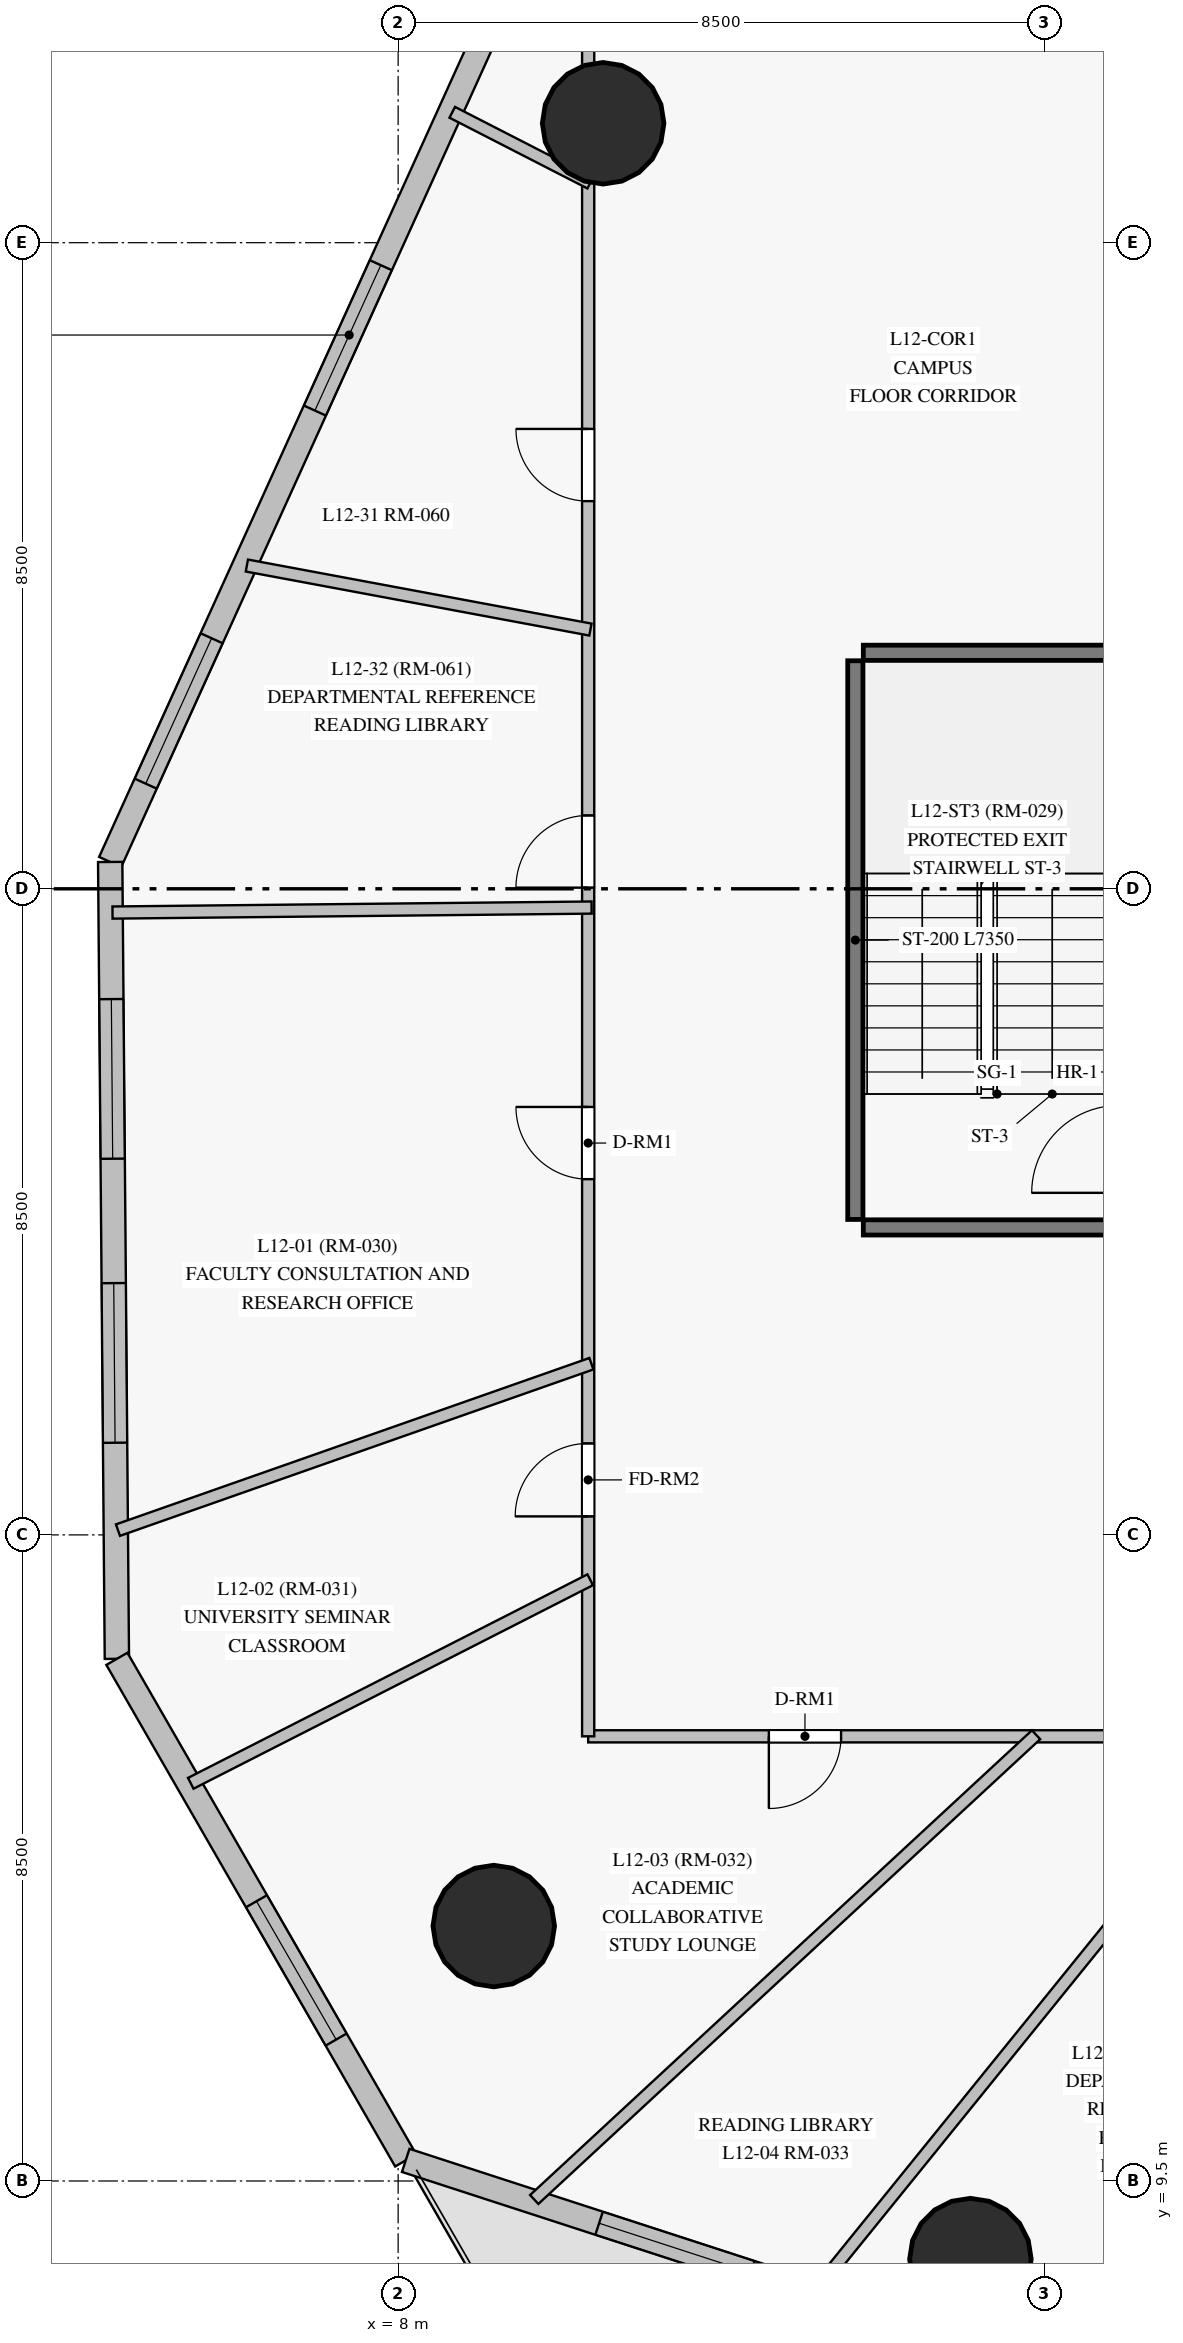
"""IFC4 building model, lengths in metres.
Left out: names, types, materials, properties, quantities, classifications, styles, units other than length and angle.
Written with IfcOpenShell. Run it as: python <this file> out.ifc"""

import sys

from ifc_helpers import new_model, si_unit, direction, frame, frame_2d, origin, origin_with_axes, origin_2d, place, context, subcontext, project, spatial, rectangle, circle, extrude, source, transform, mapped, element, fill, save


model = new_model("IFC4")
c1 = context("Model", 3, precision=1e-05, world=origin(), true_north=direction((0.0, 1.0)))
c2 = subcontext(c1, "Body", "Model", "MODEL_VIEW")
j1 = project(units=[si_unit("LENGTHUNIT", "METRE"), si_unit("PLANEANGLEUNIT", "RADIAN")], contexts=[c1])
p1 = place(None, origin())
s1 = spatial("IfcSite", under=j1, at=p1, CompositionType="ELEMENT")
p2 = place(p1, origin())
s2 = spatial("IfcBuilding", under=s1, at=p2, CompositionType="ELEMENT")
p3 = place(p2, frame((0.0, 0.0, 48.1)))
s3 = spatial("IfcBuildingStorey", under=s2, at=p3, CompositionType="ELEMENT", Elevation=48.1)
m1 = source(origin_with_axes(), c2, "Body", "SweptSolid", [
    extrude(circle(Radius=0.8, at=origin_2d()), origin(), (0.0, 0.0, 1.0), 3.6),
])
for number, where, z_axis, x_axis in (
    (1, (10.697, 36.571, 0.0), (0.0, 0.0, 1.0), (1.0, 0.0, 0.0)),
    (2, (9.258, 12.854, 0.0), (0.0, 0.0, 1.0), (1.0, 0.0, 0.0)),
    (3, (15.529, 8.472, 0.0), (0.0, 0.0, 1.0), (1.0, 0.0, 0.0)),
):
    element("IfcColumn", number, at=place(p3, frame(where, z_axis=z_axis, x_axis=x_axis)), inside=s3, PredefinedType="COLUMN", context=c2, shape_type="MappedRepresentation", body=[
        mapped(m1, transform((0.0, 0.0, 0.0), scale=1.0)),
    ])
p4 = place(p3, frame((10.499, 40.718, 0.0), z_axis=(0.0, 0.0, 1.0), x_axis=(-0.41300414516, -0.91072914529, 0.0)))
e4 = element("IfcWall", 4, at=p4, inside=s3, PredefinedType="SOLIDWALL", context=c2, shape_type="SweptSolid", body=[
    extrude(rectangle(XDim=15.224, YDim=0.32, at=frame_2d((7.612, 0.0))), origin(), (0.0, 0.0, 1.0), 3.35),
])
p5 = place(p4, frame((1.173, 0.0, 0.85)))
e5 = element("IfcOpeningElement", 5, at=p5, cuts=e4, PredefinedType="OPENING", context=c2, shape_type="SweptSolid", body=[
    extrude(rectangle(XDim=2.1, YDim=1.95, at=frame_2d((1.05, 0.975))), frame((0.0, 0.17, 0.0), z_axis=(0.0, -1.0, 0.0), x_axis=(1.0, 0.0, 0.0)), (0.0, 0.0, 1.0), 0.34),
])
p6 = place(p4, frame((6.603, 0.0, 0.85)))
e6 = element("IfcOpeningElement", 6, at=p6, cuts=e4, PredefinedType="OPENING", context=c2, shape_type="SweptSolid", body=[
    extrude(rectangle(XDim=2.1, YDim=1.95, at=frame_2d((1.05, 0.975))), frame((0.0, 0.17, 0.0), z_axis=(0.0, -1.0, 0.0), x_axis=(1.0, 0.0, 0.0)), (0.0, 0.0, 1.0), 0.34),
])
p7 = place(p4, frame((11.993, 0.0, 0.85)))
e7 = element("IfcOpeningElement", 7, at=p7, cuts=e4, PredefinedType="OPENING", context=c2, shape_type="SweptSolid", body=[
    extrude(rectangle(XDim=2.1, YDim=1.95, at=frame_2d((1.05, 0.975))), frame((0.0, 0.17, 0.0), z_axis=(0.0, -1.0, 0.0), x_axis=(1.0, 0.0, 0.0)), (0.0, 0.0, 1.0), 0.34),
])
p8 = place(p3, frame((4.212, 26.853, 0.0), z_axis=(0.0, 0.0, 1.0), x_axis=(0.00840678256, -0.999964662379, 0.0)))
e8 = element("IfcWall", 8, at=p8, inside=s3, PredefinedType="SOLIDWALL", context=c2, shape_type="SweptSolid", body=[
    extrude(rectangle(XDim=10.484, YDim=0.32, at=frame_2d((5.242, 0.0))), origin(), (0.0, 0.0, 1.0), 3.35),
])
p9 = place(p8, frame((1.804, 0.0, 0.85)))
e9 = element("IfcOpeningElement", 9, at=p9, cuts=e8, PredefinedType="OPENING", context=c2, shape_type="SweptSolid", body=[
    extrude(rectangle(XDim=2.1, YDim=1.95, at=frame_2d((1.05, 0.975))), frame((0.0, 0.17, 0.0), z_axis=(0.0, -1.0, 0.0), x_axis=(1.0, 0.0, 0.0)), (0.0, 0.0, 1.0), 0.34),
])
p10 = place(p8, frame((5.541, 0.0, 0.85)))
e10 = element("IfcOpeningElement", 10, at=p10, cuts=e8, PredefinedType="OPENING", context=c2, shape_type="SweptSolid", body=[
    extrude(rectangle(XDim=2.1, YDim=1.95, at=frame_2d((1.05, 0.975))), frame((0.0, 0.17, 0.0), z_axis=(0.0, -1.0, 0.0), x_axis=(1.0, 0.0, 0.0)), (0.0, 0.0, 1.0), 0.34),
])
p11 = place(p3, frame((4.3, 16.369, 0.0), z_axis=(0.0, 0.0, 1.0), x_axis=(0.499036685569, -0.866580859733, 0.0)))
e11 = element("IfcWall", 11, at=p11, inside=s3, PredefinedType="SOLIDWALL", context=c2, shape_type="SweptSolid", body=[
    extrude(rectangle(XDim=7.614, YDim=0.32, at=frame_2d((3.807, 0.0))), origin(), (0.0, 0.0, 1.0), 3.35),
])
p12 = place(p11, frame((3.68, 0.0, 0.85)))
e12 = element("IfcOpeningElement", 12, at=p12, cuts=e11, PredefinedType="OPENING", context=c2, shape_type="SweptSolid", body=[
    extrude(rectangle(XDim=2.1, YDim=1.95, at=frame_2d((1.05, 0.975))), frame((0.0, 0.17, 0.0), z_axis=(0.0, -1.0, 0.0), x_axis=(1.0, 0.0, 0.0)), (0.0, 0.0, 1.0), 0.34),
])
p13 = place(p3, frame((8.1, 9.771, 0.0), z_axis=(0.0, 0.0, 1.0), x_axis=(0.951043115776, -0.30905823389, 0.0)))
e13 = element("IfcWall", 13, at=p13, inside=s3, PredefinedType="SOLIDWALL", context=c2, shape_type="SweptSolid", body=[
    extrude(rectangle(XDim=18.442, YDim=0.32, at=frame_2d((9.221, 0.0))), origin(), (0.0, 0.0, 1.0), 3.35),
])
p14 = place(p13, frame((2.675, 0.0, 0.85)))
e14 = element("IfcOpeningElement", 14, at=p14, cuts=e13, PredefinedType="OPENING", context=c2, shape_type="SweptSolid", body=[
    extrude(rectangle(XDim=2.1, YDim=1.95, at=frame_2d((1.05, 0.975))), frame((0.0, 0.17, 0.0), z_axis=(0.0, -1.0, 0.0), x_axis=(1.0, 0.0, 0.0)), (0.0, 0.0, 1.0), 0.34),
])
p15 = place(p13, frame((10.64, 0.0, 0.85)))
e15 = element("IfcOpeningElement", 15, at=p15, cuts=e13, PredefinedType="OPENING", context=c2, shape_type="SweptSolid", body=[
    extrude(rectangle(XDim=2.1, YDim=1.95, at=frame_2d((1.05, 0.975))), frame((0.0, 0.17, 0.0), z_axis=(0.0, -1.0, 0.0), x_axis=(1.0, 0.0, 0.0)), (0.0, 0.0, 1.0), 0.34),
])
p16 = place(p13, frame((14.843, 0.0, 0.0)))
e16 = element("IfcOpeningElement", 16, at=p16, cuts=e13, PredefinedType="OPENING", context=c2, shape_type="SweptSolid", body=[
    extrude(rectangle(XDim=1.05, YDim=2.12, at=frame_2d((0.525, 1.06))), frame((0.0, 0.17, 0.0), z_axis=(0.0, -1.0, 0.0), x_axis=(1.0, 0.0, 0.0)), (0.0, 0.0, 1.0), 0.34),
])
p17 = place(p3, frame((14.015, 22.15, 0.0), z_axis=(0.0, 0.0, 1.0), x_axis=(0.0, 1.0, 0.0)))
e17 = element("IfcWall", 17, at=p17, inside=s3, PredefinedType="SHEAR", context=c2, shape_type="SweptSolid", body=[
    extrude(rectangle(XDim=7.35, YDim=0.2, at=frame_2d((3.675, 0.0))), origin(), (0.0, 0.0, 1.0), 3.35),
])
for number, where, z_axis, x_axis in (
    (18, (14.12, 22.045, 0.0), (0.0, 0.0, 1.0), (1.0, 0.0, 0.0)),
    (19, (14.12, 29.605, 0.0), (0.0, 0.0, 1.0), (1.0, 0.0, 0.0)),
):
    element("IfcWall", number, at=place(p3, frame(where, z_axis=z_axis, x_axis=x_axis)), inside=s3, PredefinedType="SHEAR", context=c2, shape_type="SweptSolid", body=[
        extrude(rectangle(XDim=3.26, YDim=0.2, at=frame_2d((1.63, 0.0))), origin(), (0.0, 0.0, 1.0), 3.35),
    ])
p18 = place(p3, frame((40.25, 15.35, 0.0), z_axis=(0.0, 0.0, 1.0), x_axis=(-1.0, 0.0, 0.0)))
e20 = element("IfcWall", 20, at=p18, inside=s3, PredefinedType="PARTITIONING", context=c2, shape_type="SweptSolid", body=[
    extrude(rectangle(XDim=29.75, YDim=0.16, at=frame_2d((14.875, 0.0))), origin(), (0.0, 0.0, 1.0), 2.7),
])
p19 = place(p18, frame((26.423, 0.0, 0.0)))
e21 = element("IfcOpeningElement", 21, at=p19, cuts=e20, PredefinedType="OPENING", context=c2, shape_type="SweptSolid", body=[
    extrude(rectangle(XDim=0.95, YDim=2.15, at=frame_2d((0.475, 1.075))), frame((0.0, 0.09, 0.0), z_axis=(0.0, -1.0, 0.0), x_axis=(1.0, 0.0, 0.0)), (0.0, 0.0, 1.0), 0.18),
])
p20 = place(p18, frame((21.837, 0.0, 0.0)))
e22 = element("IfcOpeningElement", 22, at=p20, cuts=e20, PredefinedType="OPENING", context=c2, shape_type="SweptSolid", body=[
    extrude(rectangle(XDim=0.95, YDim=2.15, at=frame_2d((0.475, 1.075))), frame((0.0, 0.09, 0.0), z_axis=(0.0, -1.0, 0.0), x_axis=(1.0, 0.0, 0.0)), (0.0, 0.0, 1.0), 0.18),
])
p21 = place(p18, frame((18.863, 0.0, 0.0)))
e23 = element("IfcOpeningElement", 23, at=p21, cuts=e20, PredefinedType="OPENING", context=c2, shape_type="SweptSolid", body=[
    extrude(rectangle(XDim=0.95, YDim=2.15, at=frame_2d((0.475, 1.075))), frame((0.0, 0.09, 0.0), z_axis=(0.0, -1.0, 0.0), x_axis=(1.0, 0.0, 0.0)), (0.0, 0.0, 1.0), 0.18),
])
p22 = place(p18, frame((16.388, 0.0, 0.0)))
e24 = element("IfcOpeningElement", 24, at=p22, cuts=e20, PredefinedType="OPENING", context=c2, shape_type="SweptSolid", body=[
    extrude(rectangle(XDim=0.95, YDim=2.15, at=frame_2d((0.475, 1.075))), frame((0.0, 0.09, 0.0), z_axis=(0.0, -1.0, 0.0), x_axis=(1.0, 0.0, 0.0)), (0.0, 0.0, 1.0), 0.18),
])
p23 = place(p18, frame((14.4, 0.0, 0.0)))
e25 = element("IfcOpeningElement", 25, at=p23, cuts=e20, PredefinedType="OPENING", context=c2, shape_type="SweptSolid", body=[
    extrude(rectangle(XDim=0.95, YDim=2.15, at=frame_2d((0.475, 1.075))), frame((0.0, 0.09, 0.0), z_axis=(0.0, -1.0, 0.0), x_axis=(1.0, 0.0, 0.0)), (0.0, 0.0, 1.0), 0.18),
])
p24 = place(p18, frame((12.118, 0.0, 0.0)))
e26 = element("IfcOpeningElement", 26, at=p24, cuts=e20, PredefinedType="OPENING", context=c2, shape_type="SweptSolid", body=[
    extrude(rectangle(XDim=0.95, YDim=2.15, at=frame_2d((0.475, 1.075))), frame((0.0, 0.09, 0.0), z_axis=(0.0, -1.0, 0.0), x_axis=(1.0, 0.0, 0.0)), (0.0, 0.0, 1.0), 0.18),
])
p25 = place(p18, frame((9.938, 0.0, 0.0)))
e27 = element("IfcOpeningElement", 27, at=p25, cuts=e20, PredefinedType="OPENING", context=c2, shape_type="SweptSolid", body=[
    extrude(rectangle(XDim=0.95, YDim=2.15, at=frame_2d((0.475, 1.075))), frame((0.0, 0.09, 0.0), z_axis=(0.0, -1.0, 0.0), x_axis=(1.0, 0.0, 0.0)), (0.0, 0.0, 1.0), 0.18),
])
p26 = place(p18, frame((6.962, 0.0, 0.0)))
e28 = element("IfcOpeningElement", 28, at=p26, cuts=e20, PredefinedType="OPENING", context=c2, shape_type="SweptSolid", body=[
    extrude(rectangle(XDim=0.95, YDim=2.15, at=frame_2d((0.475, 1.075))), frame((0.0, 0.09, 0.0), z_axis=(0.0, -1.0, 0.0), x_axis=(1.0, 0.0, 0.0)), (0.0, 0.0, 1.0), 0.18),
])
p27 = place(p3, frame((10.5, 15.35, 0.0), z_axis=(0.0, 0.0, 1.0), x_axis=(0.0, 1.0, 0.0)))
e29 = element("IfcWall", 29, at=p27, inside=s3, PredefinedType="PARTITIONING", context=c2, shape_type="SweptSolid", body=[
    extrude(rectangle(XDim=22.3, YDim=0.16, at=frame_2d((11.15, 0.0))), origin(), (0.0, 0.0, 1.0), 2.75),
])
p28 = place(p27, frame((7.33, 0.0, 0.0)))
e30 = element("IfcOpeningElement", 30, at=p28, cuts=e29, PredefinedType="OPENING", context=c2, shape_type="SweptSolid", body=[
    extrude(rectangle(XDim=0.95, YDim=2.15, at=frame_2d((0.475, 1.075))), frame((0.0, 0.09, 0.0), z_axis=(0.0, -1.0, 0.0), x_axis=(1.0, 0.0, 0.0)), (0.0, 0.0, 1.0), 0.18),
])
p29 = place(p27, frame((2.893, 0.0, 0.0)))
e31 = element("IfcOpeningElement", 31, at=p29, cuts=e29, PredefinedType="OPENING", context=c2, shape_type="SweptSolid", body=[
    extrude(rectangle(XDim=0.96, YDim=2.15, at=frame_2d((0.48, 1.075))), frame((0.0, 0.09, 0.0), z_axis=(0.0, -1.0, 0.0), x_axis=(1.0, 0.0, 0.0)), (0.0, 0.0, 1.0), 0.18),
])
p30 = place(p27, frame((16.25, 0.0, 0.0)))
e32 = element("IfcOpeningElement", 32, at=p30, cuts=e29, PredefinedType="OPENING", context=c2, shape_type="SweptSolid", body=[
    extrude(rectangle(XDim=0.95, YDim=2.15, at=frame_2d((0.475, 1.075))), frame((0.0, 0.09, 0.0), z_axis=(0.0, -1.0, 0.0), x_axis=(1.0, 0.0, 0.0)), (0.0, 0.0, 1.0), 0.18),
])
p31 = place(p27, frame((11.165, 0.0, 0.0)))
e33 = element("IfcOpeningElement", 33, at=p31, cuts=e29, PredefinedType="OPENING", context=c2, shape_type="SweptSolid", body=[
    extrude(rectangle(XDim=0.95, YDim=2.15, at=frame_2d((0.475, 1.075))), frame((0.0, 0.09, 0.0), z_axis=(0.0, -1.0, 0.0), x_axis=(1.0, 0.0, 0.0)), (0.0, 0.0, 1.0), 0.18),
])
p32 = place(p3, frame((19.423, 15.385, 0.0), z_axis=(0.0, 0.0, 1.0), x_axis=(-0.629284562833, -0.777174973208, 0.0)))
e34 = element("IfcWall", 34, at=p32, inside=s3, PredefinedType="PARTITIONING", context=c2, shape_type="SweptSolid", body=[
    extrude(rectangle(XDim=9.436, YDim=0.16, at=frame_2d((4.718, 0.0))), origin(), (0.0, 0.0, 1.0), 2.7),
])
p33 = place(p3, frame((16.393, 15.37, 0.0), z_axis=(0.0, 0.0, 1.0), x_axis=(-0.733730115862, -0.679441032818, 0.0)))
e35 = element("IfcWall", 35, at=p33, inside=s3, PredefinedType="PARTITIONING", context=c2, shape_type="SweptSolid", body=[
    extrude(rectangle(XDim=8.999, YDim=0.16, at=frame_2d((4.499, 0.0))), origin(), (0.0, 0.0, 1.0), 3.35),
])
p34 = place(p3, frame((10.542, 20.252, 0.0), z_axis=(0.0, 0.0, 1.0), x_axis=(-0.943421687101, -0.331595416597, 0.0)))
e36 = element("IfcWall", 36, at=p34, inside=s3, PredefinedType="PARTITIONING", context=c2, shape_type="SweptSolid", body=[
    extrude(rectangle(XDim=6.602, YDim=0.16, at=frame_2d((3.301, 0.0))), origin(), (0.0, 0.0, 1.0), 3.35),
])
p35 = place(p3, frame((4.242, 26.188, 0.0), z_axis=(0.0, 0.0, 1.0), x_axis=(0.999945721523, 0.010418925479, 0.0)))
e37 = element("IfcWall", 37, at=p35, inside=s3, PredefinedType="PARTITIONING", context=c2, shape_type="SweptSolid", body=[
    extrude(rectangle(XDim=6.303, YDim=0.16, at=frame_2d((3.152, 0.0))), origin(), (0.0, 0.0, 1.0), 3.35),
])
p36 = place(p3, frame((10.527, 17.409, 0.0), z_axis=(0.0, 0.0, 1.0), x_axis=(-0.89100695579, -0.453989652673, 0.0)))
e38 = element("IfcWall", 38, at=p36, inside=s3, PredefinedType="PARTITIONING", context=c2, shape_type="SweptSolid", body=[
    extrude(rectangle(XDim=5.898, YDim=0.16, at=frame_2d((2.949, 0.0))), origin(), (0.0, 0.0, 1.0), 3.35),
])
p37 = place(p3, frame((10.53, 29.91, 0.0), z_axis=(0.0, 0.0, 1.0), x_axis=(-0.983075377026, 0.183201536798, 0.0)))
e39 = element("IfcWall", 39, at=p37, inside=s3, PredefinedType="PARTITIONING", context=c2, shape_type="SweptSolid", body=[
    extrude(rectangle(XDim=4.598, YDim=0.16, at=frame_2d((2.299, 0.0))), origin(), (0.0, 0.0, 1.0), 3.35),
])
p38 = place(p3, frame((10.527, 35.785, 0.0), z_axis=(0.0, 0.0, 1.0), x_axis=(-0.889807491926, 0.456336090303, 0.0)))
e40 = element("IfcWall", 40, at=p38, inside=s3, PredefinedType="PARTITIONING", context=c2, shape_type="SweptSolid", body=[
    extrude(rectangle(XDim=2.039, YDim=0.16, at=frame_2d((1.02, 0.0))), origin(), (0.0, 0.0, 1.0), 3.35),
])
m2 = source(origin_with_axes(), c2, "Body", "SweptSolid", [
    extrude(rectangle(XDim=2.1, YDim=1.95, at=frame_2d((1.05, 0.975))), frame((0.0, 0.03, 0.0), z_axis=(0.0, -1.0, 0.0), x_axis=(1.0, 0.0, 0.0)), (0.0, 0.0, 1.0), 0.06),
])
p39 = place(p6, origin())
e41 = element("IfcWindow", 41, at=p39, inside=s3, PartitioningType="SINGLE_PANEL", PredefinedType="WINDOW", context=c2, shape_type="MappedRepresentation", body=[
    mapped(m2, transform((0.0, 0.0, 0.0), scale=1.0)),
])
fill(e6, e41)
p40 = place(p7, origin())
e42 = element("IfcWindow", 42, at=p40, inside=s3, PartitioningType="SINGLE_PANEL", PredefinedType="WINDOW", context=c2, shape_type="MappedRepresentation", body=[
    mapped(m2, transform((0.0, 0.0, 0.0), scale=1.0)),
])
fill(e7, e42)
p41 = place(p9, origin())
e43 = element("IfcWindow", 43, at=p41, inside=s3, PartitioningType="SINGLE_PANEL", PredefinedType="WINDOW", context=c2, shape_type="MappedRepresentation", body=[
    mapped(m2, transform((0.0, 0.0, 0.0), scale=1.0)),
])
fill(e9, e43)
p42 = place(p10, origin())
e44 = element("IfcWindow", 44, at=p42, inside=s3, PartitioningType="SINGLE_PANEL", PredefinedType="WINDOW", context=c2, shape_type="MappedRepresentation", body=[
    mapped(m2, transform((0.0, 0.0, 0.0), scale=1.0)),
])
fill(e10, e44)
p43 = place(p12, origin())
e45 = element("IfcWindow", 45, at=p43, inside=s3, PartitioningType="SINGLE_PANEL", PredefinedType="WINDOW", context=c2, shape_type="MappedRepresentation", body=[
    mapped(m2, transform((0.0, 0.0, 0.0), scale=1.0)),
])
fill(e12, e45)
p44 = place(p14, origin())
e46 = element("IfcWindow", 46, at=p44, inside=s3, PartitioningType="SINGLE_PANEL", PredefinedType="WINDOW", context=c2, shape_type="MappedRepresentation", body=[
    mapped(m2, transform((0.0, 0.0, 0.0), scale=1.0)),
])
fill(e14, e46)
m3 = source(origin_with_axes(), c2, "Body", "SweptSolid", [
    extrude(rectangle(XDim=0.95, YDim=2.15, at=frame_2d((0.475, 1.075))), frame((0.0, 0.025, 0.0), z_axis=(0.0, -1.0, 0.0), x_axis=(1.0, 0.0, 0.0)), (0.0, 0.0, 1.0), 0.05),
])
p45 = place(p28, origin())
e47 = element("IfcDoor", 47, at=p45, inside=s3, OperationType="SINGLE_SWING_RIGHT", PredefinedType="DOOR", context=c2, shape_type="MappedRepresentation", body=[
    mapped(m3, transform((0.0, 0.0, 0.0), scale=1.0)),
])
fill(e30, e47)
m4 = source(origin_with_axes(), c2, "Body", "SweptSolid", [
    extrude(rectangle(XDim=0.96, YDim=2.15, at=frame_2d((0.48, 1.075))), frame((0.0, 0.025, 0.0), z_axis=(0.0, -1.0, 0.0), x_axis=(1.0, 0.0, 0.0)), (0.0, 0.0, 1.0), 0.05),
])
p46 = place(p29, origin())
e48 = element("IfcDoor", 48, at=p46, inside=s3, OperationType="SINGLE_SWING_LEFT", PredefinedType="DOOR", context=c2, shape_type="MappedRepresentation", body=[
    mapped(m4, transform((0.0, 0.0, 0.0), scale=1.0)),
])
fill(e31, e48)
p47 = place(p19, origin())
e49 = element("IfcDoor", 49, at=p47, inside=s3, OperationType="SINGLE_SWING_RIGHT", PredefinedType="DOOR", context=c2, shape_type="MappedRepresentation", body=[
    mapped(m3, transform((0.0, 0.0, 0.0), scale=1.0)),
])
fill(e21, e49)
p48 = place(p30, origin())
e50 = element("IfcDoor", 50, at=p48, inside=s3, OperationType="SINGLE_SWING_RIGHT", PredefinedType="DOOR", context=c2, shape_type="MappedRepresentation", body=[
    mapped(m3, transform((0.0, 0.0, 0.0), scale=1.0)),
])
fill(e32, e50)
p49 = place(p31, origin())
e51 = element("IfcDoor", 51, at=p49, inside=s3, OperationType="SINGLE_SWING_LEFT", PredefinedType="DOOR", context=c2, shape_type="MappedRepresentation", body=[
    mapped(m3, transform((0.0, 0.0, 0.0), scale=1.0)),
])
fill(e33, e51)
save(model, sys.argv[1])
